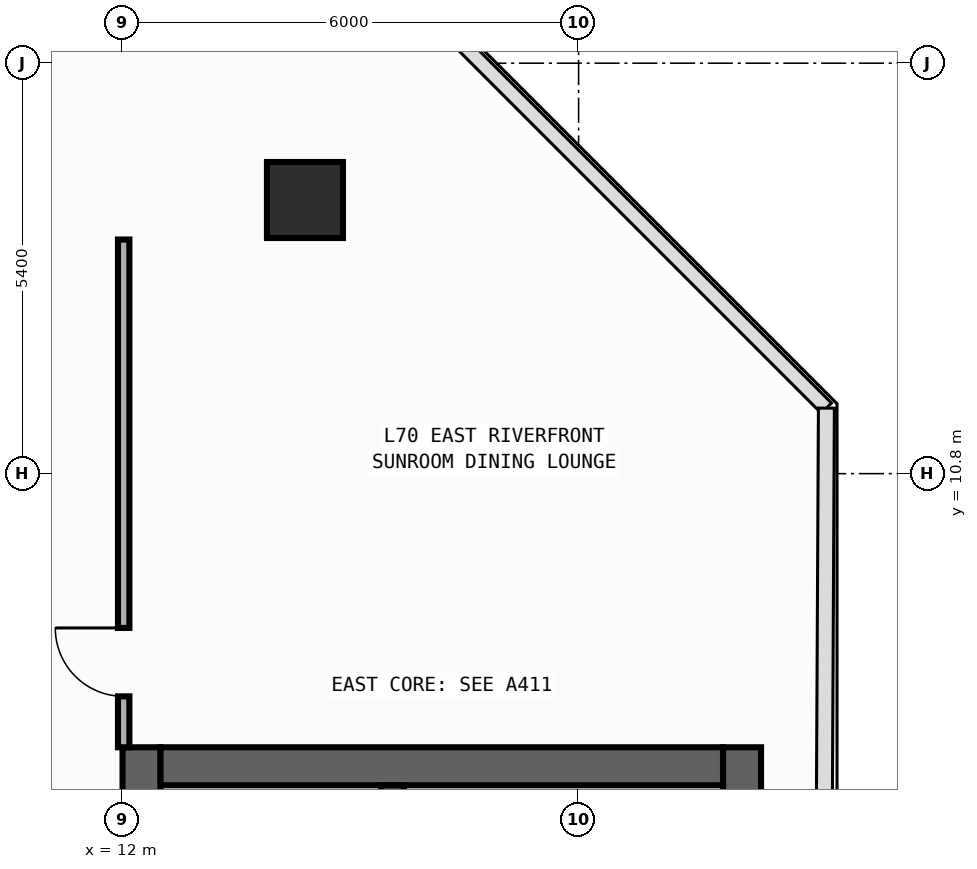
"""IFC4 building model, lengths in metres.
Left out: names, types, materials, properties, quantities, classifications, styles, units other than length and angle.
Written with IfcOpenShell. Run it as: python <this file> out.ifc"""

import sys

from ifc_helpers import new_model, si_unit, direction, frame, frame_2d, origin, origin_2d, place, context, subcontext, project, spatial, rectangle, circle, extrude, element, fill, save


model = new_model("IFC4")
c1 = context("Model", 3, precision=1e-05, world=origin(), true_north=direction((0.0, 1.0)))
c2 = subcontext(c1, "Body", "Model", "MODEL_VIEW")
j1 = project(units=[si_unit("LENGTHUNIT", "METRE"), si_unit("PLANEANGLEUNIT", "RADIAN")], contexts=[c1])
p1 = place(None, origin())
s1 = spatial("IfcSite", under=j1, at=p1, CompositionType="ELEMENT")
p2 = place(p1, origin())
s2 = spatial("IfcBuilding", under=s1, at=p2, CompositionType="ELEMENT")
p3 = place(p2, frame((0.0, 0.0, 292.8)))
s3 = spatial("IfcBuildingStorey", under=s2, at=p3, CompositionType="ELEMENT", Elevation=292.8)
p4 = place(p3, frame((12.25, -19.8, 0.0), z_axis=(0.0, 0.0, 1.0), x_axis=(0.0, 1.0, 0.0)))
e1 = element("IfcWall", 1, at=p4, inside=s3, PredefinedType="SHEAR", context=c2, shape_type="SweptSolid", body=[
    extrude(rectangle(XDim=27.0, YDim=0.5, at=frame_2d((13.5, 0.0))), origin(), (0.0, 0.0, 1.0), 3.54),
])
p5 = place(p4, frame((23.05, 0.0, 0.0)))
e2 = element("IfcOpeningElement", 2, at=p5, cuts=e1, PredefinedType="OPENING", context=c2, shape_type="SweptSolid", body=[
    extrude(rectangle(XDim=1.1, YDim=2.2, at=frame_2d((0.55, 1.1))), frame((0.0, 0.26, 0.0), z_axis=(0.0, -1.0, 0.0), x_axis=(1.0, 0.0, 0.0)), (0.0, 0.0, 1.0), 0.52),
])
p6 = place(p4, frame((19.85, 0.0, 0.0)))
e3 = element("IfcOpeningElement", 3, at=p6, cuts=e1, PredefinedType="OPENING", context=c2, shape_type="SweptSolid", body=[
    extrude(rectangle(XDim=1.1, YDim=2.2, at=frame_2d((0.55, 1.1))), frame((0.0, 0.26, 0.0), z_axis=(0.0, -1.0, 0.0), x_axis=(1.0, 0.0, 0.0)), (0.0, 0.0, 1.0), 0.52),
])
p7 = place(p4, frame((16.65, 0.0, 0.0)))
e4 = element("IfcOpeningElement", 4, at=p7, cuts=e1, PredefinedType="OPENING", context=c2, shape_type="SweptSolid", body=[
    extrude(rectangle(XDim=1.1, YDim=2.2, at=frame_2d((0.55, 1.1))), frame((0.0, 0.26, 0.0), z_axis=(0.0, -1.0, 0.0), x_axis=(1.0, 0.0, 0.0)), (0.0, 0.0, 1.0), 0.52),
])
p8 = place(p4, frame((6.275, 0.0, 0.0)))
e5 = element("IfcOpeningElement", 5, at=p8, cuts=e1, PredefinedType="OPENING", context=c2, shape_type="SweptSolid", body=[
    extrude(rectangle(XDim=0.85, YDim=2.1, at=frame_2d((0.425, 1.05))), frame((0.0, 0.26, 0.0), z_axis=(0.0, -1.0, 0.0), x_axis=(1.0, 0.0, 0.0)), (0.0, 0.0, 1.0), 0.52),
])
p9 = place(p4, frame((8.575, 0.0, 0.0)))
e6 = element("IfcOpeningElement", 6, at=p9, cuts=e1, PredefinedType="OPENING", context=c2, shape_type="SweptSolid", body=[
    extrude(rectangle(XDim=0.85, YDim=2.1, at=frame_2d((0.425, 1.05))), frame((0.0, 0.26, 0.0), z_axis=(0.0, -1.0, 0.0), x_axis=(1.0, 0.0, 0.0)), (0.0, 0.0, 1.0), 0.52),
])
p10 = place(p4, frame((10.675, 0.0, 0.0)))
e7 = element("IfcOpeningElement", 7, at=p10, cuts=e1, PredefinedType="OPENING", context=c2, shape_type="SweptSolid", body=[
    extrude(rectangle(XDim=0.85, YDim=2.1, at=frame_2d((0.425, 1.05))), frame((0.0, 0.26, 0.0), z_axis=(0.0, -1.0, 0.0), x_axis=(1.0, 0.0, 0.0)), (0.0, 0.0, 1.0), 0.52),
])
p11 = place(p4, frame((12.725, 0.0, 0.0)))
e8 = element("IfcOpeningElement", 8, at=p11, cuts=e1, PredefinedType="OPENING", context=c2, shape_type="SweptSolid", body=[
    extrude(rectangle(XDim=1.15, YDim=2.2, at=frame_2d((0.575, 1.1))), frame((0.0, 0.26, 0.0), z_axis=(0.0, -1.0, 0.0), x_axis=(1.0, 0.0, 0.0)), (0.0, 0.0, 1.0), 0.52),
])
p12 = place(p4, frame((25.125, 0.0, 0.0)))
e9 = element("IfcOpeningElement", 9, at=p12, cuts=e1, PredefinedType="OPENING", context=c2, shape_type="SweptSolid", body=[
    extrude(rectangle(XDim=0.85, YDim=2.1, at=frame_2d((0.425, 1.05))), frame((0.0, 0.26, 0.0), z_axis=(0.0, -1.0, 0.0), x_axis=(1.0, 0.0, 0.0)), (0.0, 0.0, 1.0), 0.52),
])
p13 = place(p3, frame((20.15, -19.8, 0.0), z_axis=(0.0, 0.0, 1.0), x_axis=(0.0, 1.0, 0.0)))
e10 = element("IfcWall", 10, at=p13, inside=s3, PredefinedType="SHEAR", context=c2, shape_type="SweptSolid", body=[
    extrude(rectangle(XDim=27.0, YDim=0.5, at=frame_2d((13.5, 0.0))), origin(), (0.0, 0.0, 1.0), 3.54),
])
p14 = place(p3, frame((12.5, 6.95, 0.0), z_axis=(0.0, 0.0, 1.0), x_axis=(1.0, 0.0, 0.0)))
e11 = element("IfcWall", 11, at=p14, inside=s3, PredefinedType="SHEAR", context=c2, shape_type="SweptSolid", body=[
    extrude(rectangle(XDim=7.4, YDim=0.5, at=frame_2d((3.7, 0.0))), origin(), (0.0, 0.0, 1.0), 3.54),
])
p15 = place(p3, frame((15.55, -19.3, 0.0), z_axis=(0.0, 0.0, 1.0), x_axis=(0.0, 1.0, 0.0)))
e12 = element("IfcWall", 12, at=p15, inside=s3, PredefinedType="SHEAR", context=c2, shape_type="SweptSolid", body=[
    extrude(rectangle(XDim=26.0, YDim=0.3, at=frame_2d((13.0, 0.0))), origin(), (0.0, 0.0, 1.0), 3.54),
])
p16 = place(p15, frame((12.225, 0.0, 0.0)))
e13 = element("IfcOpeningElement", 13, at=p16, cuts=e12, PredefinedType="OPENING", context=c2, shape_type="SweptSolid", body=[
    extrude(rectangle(XDim=1.15, YDim=2.2, at=frame_2d((0.575, 1.1))), frame((0.0, 0.16, 0.0), z_axis=(0.0, -1.0, 0.0), x_axis=(1.0, 0.0, 0.0)), (0.0, 0.0, 1.0), 0.32),
])
p17 = place(p15, frame((24.625, 0.0, 0.0)))
e14 = element("IfcOpeningElement", 14, at=p17, cuts=e12, PredefinedType="OPENING", context=c2, shape_type="SweptSolid", body=[
    extrude(rectangle(XDim=0.85, YDim=2.1, at=frame_2d((0.425, 1.05))), frame((0.0, 0.16, 0.0), z_axis=(0.0, -1.0, 0.0), x_axis=(1.0, 0.0, 0.0)), (0.0, 0.0, 1.0), 0.32),
])
p18 = place(p3, frame((14.4, 14.4, 0.0), z_axis=(0.0, 0.0, 1.0), x_axis=(1.0, 0.0, 0.0)))
e15 = element("IfcColumn", 15, at=p18, inside=s3, PredefinedType="COLUMN", context=c2, shape_type="SweptSolid", body=[
    extrude(circle(Radius=0.5, at=origin_2d()), origin(), (0.0, 0.0, 1.0), 3.8),
])
p19 = place(p3, frame((12.015, 7.2, 0.0), z_axis=(0.0, 0.0, 1.0), x_axis=(0.0, 1.0, 0.0)))
e16 = element("IfcWall", 16, at=p19, inside=s3, PredefinedType="PARTITIONING", context=c2, shape_type="SweptSolid", body=[
    extrude(rectangle(XDim=6.68, YDim=0.15, at=frame_2d((3.34, 0.0))), origin(), (0.0, 0.0, 1.0), 3.54),
])
p20 = place(p19, frame((0.67, 0.0, 0.0)))
e17 = element("IfcOpeningElement", 17, at=p20, cuts=e16, PredefinedType="OPENING", context=c2, shape_type="SweptSolid", body=[
    extrude(rectangle(XDim=0.9, YDim=2.15, at=frame_2d((0.45, 1.075))), frame((0.0, 0.085, 0.0), z_axis=(0.0, -1.0, 0.0), x_axis=(1.0, 0.0, 0.0)), (0.0, 0.0, 1.0), 0.17),
])
p21 = place(p20, origin())
e18 = element("IfcDoor", 18, at=p21, inside=s3, OperationType="SINGLE_SWING_RIGHT", PredefinedType="DOOR", context=c2, shape_type="SweptSolid", body=[
    extrude(rectangle(XDim=0.9, YDim=2.15, at=frame_2d((0.45, 1.075))), frame((0.0, 0.025, 0.0), z_axis=(0.0, -1.0, 0.0), x_axis=(1.0, 0.0, 0.0)), (0.0, 0.0, 1.0), 0.05),
])
fill(e17, e18)
save(model, sys.argv[1])
